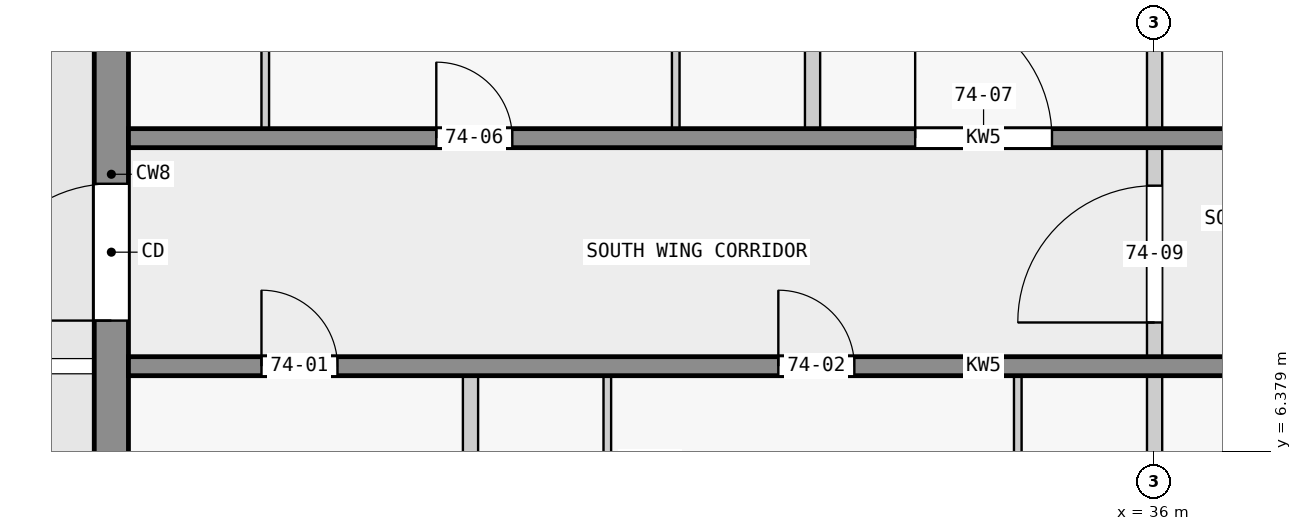
"""IFC4 building model, lengths in metres.
Left out: names, types, materials, properties, quantities, classifications, styles, units other than length and angle.
Written with IfcOpenShell. Run it as: python <this file> out.ifc"""

import sys

from ifc_helpers import new_model, si_unit, direction, frame, frame_2d, origin, place, context, subcontext, project, spatial, rectangle, extrude, element, fill, save


model = new_model("IFC4")
c1 = context("Model", 3, precision=1e-05, world=origin(), true_north=direction((0.0, 1.0)))
c2 = subcontext(c1, "Body", "Model", "MODEL_VIEW")
j1 = project(units=[si_unit("LENGTHUNIT", "METRE"), si_unit("PLANEANGLEUNIT", "RADIAN")], contexts=[c1])
p1 = place(None, origin())
s1 = spatial("IfcSite", under=j1, at=p1, CompositionType="ELEMENT")
p2 = place(p1, origin())
s2 = spatial("IfcBuilding", under=s1, at=p2, CompositionType="ELEMENT")
p3 = place(p2, frame((0.0, 0.0, 280.9)))
s3 = spatial("IfcBuildingStorey", under=s2, at=p3, CompositionType="ELEMENT", Elevation=280.9)
p4 = place(p3, frame((22.275, 2.5, 0.0), z_axis=(0.0, 0.0, 1.0), x_axis=(0.0, 1.0, 0.0)))
e1 = element("IfcWall", 1, at=p4, inside=s3, PredefinedType="SHEAR", context=c2, shape_type="SweptSolid", body=[
    extrude(rectangle(XDim=15.05, YDim=0.45, at=frame_2d((7.525, 0.0))), origin(), (0.0, 0.0, 1.0), 3.25),
])
p5 = place(p4, frame((5.6, 0.0, 0.0)))
e2 = element("IfcOpeningElement", 2, at=p5, cuts=e1, PredefinedType="OPENING", context=c2, shape_type="SweptSolid", body=[
    extrude(rectangle(XDim=1.8, YDim=2.1, at=frame_2d((0.9, 1.05))), frame((0.0, 0.235, 0.0), z_axis=(0.0, -1.0, 0.0), x_axis=(1.0, 0.0, 0.0)), (0.0, 0.0, 1.0), 0.47),
])
p6 = place(p3, frame((22.5, 7.5, 0.0), z_axis=(0.0, 0.0, 1.0), x_axis=(1.0, 0.0, 0.0)))
e3 = element("IfcWall", 3, at=p6, inside=s3, PredefinedType="SHEAR", context=c2, shape_type="SweptSolid", body=[
    extrude(rectangle(XDim=22.5, YDim=0.25, at=frame_2d((11.25, 0.0))), origin(), (0.0, 0.0, 1.0), 3.25),
])
p7 = place(p6, frame((1.75, 0.0, 0.0)))
e4 = element("IfcOpeningElement", 4, at=p7, cuts=e3, PredefinedType="OPENING", context=c2, shape_type="SweptSolid", body=[
    extrude(rectangle(XDim=1.0, YDim=2.1, at=frame_2d((0.5, 1.05))), frame((0.0, 0.135, 0.0), z_axis=(0.0, -1.0, 0.0), x_axis=(1.0, 0.0, 0.0)), (0.0, 0.0, 1.0), 0.27),
])
p8 = place(p6, frame((8.55, 0.0, 0.0)))
e5 = element("IfcOpeningElement", 5, at=p8, cuts=e3, PredefinedType="OPENING", context=c2, shape_type="SweptSolid", body=[
    extrude(rectangle(XDim=1.0, YDim=2.1, at=frame_2d((0.5, 1.05))), frame((0.0, 0.135, 0.0), z_axis=(0.0, -1.0, 0.0), x_axis=(1.0, 0.0, 0.0)), (0.0, 0.0, 1.0), 0.27),
])
p9 = place(p6, frame((15.25, 0.0, 0.0)))
e6 = element("IfcOpeningElement", 6, at=p9, cuts=e3, PredefinedType="OPENING", context=c2, shape_type="SweptSolid", body=[
    extrude(rectangle(XDim=1.0, YDim=2.1, at=frame_2d((0.5, 1.05))), frame((0.0, 0.135, 0.0), z_axis=(0.0, -1.0, 0.0), x_axis=(1.0, 0.0, 0.0)), (0.0, 0.0, 1.0), 0.27),
])
p10 = place(p6, frame((18.75, 0.0, 0.0)))
e7 = element("IfcOpeningElement", 7, at=p10, cuts=e3, PredefinedType="OPENING", context=c2, shape_type="SweptSolid", body=[
    extrude(rectangle(XDim=0.9, YDim=2.1, at=frame_2d((0.45, 1.05))), frame((0.0, 0.135, 0.0), z_axis=(0.0, -1.0, 0.0), x_axis=(1.0, 0.0, 0.0)), (0.0, 0.0, 1.0), 0.27),
])
p11 = place(p6, frame((20.95, 0.0, 0.0)))
e8 = element("IfcOpeningElement", 8, at=p11, cuts=e3, PredefinedType="OPENING", context=c2, shape_type="SweptSolid", body=[
    extrude(rectangle(XDim=1.0, YDim=2.1, at=frame_2d((0.5, 1.05))), frame((0.0, 0.135, 0.0), z_axis=(0.0, -1.0, 0.0), x_axis=(1.0, 0.0, 0.0)), (0.0, 0.0, 1.0), 0.27),
])
p12 = place(p3, frame((22.5, 10.5, 0.0), z_axis=(0.0, 0.0, 1.0), x_axis=(1.0, 0.0, 0.0)))
e9 = element("IfcWall", 9, at=p12, inside=s3, PredefinedType="SHEAR", context=c2, shape_type="SweptSolid", body=[
    extrude(rectangle(XDim=22.5, YDim=0.25, at=frame_2d((11.25, 0.0))), origin(), (0.0, 0.0, 1.0), 3.25),
])
p13 = place(p12, frame((4.05, 0.0, 0.0)))
e10 = element("IfcOpeningElement", 10, at=p13, cuts=e9, PredefinedType="OPENING", context=c2, shape_type="SweptSolid", body=[
    extrude(rectangle(XDim=1.0, YDim=2.1, at=frame_2d((0.5, 1.05))), frame((0.0, 0.135, 0.0), z_axis=(0.0, -1.0, 0.0), x_axis=(1.0, 0.0, 0.0)), (0.0, 0.0, 1.0), 0.27),
])
p14 = place(p12, frame((10.35, 0.0, 0.0)))
e11 = element("IfcOpeningElement", 11, at=p14, cuts=e9, PredefinedType="OPENING", context=c2, shape_type="SweptSolid", body=[
    extrude(rectangle(XDim=1.8, YDim=2.1, at=frame_2d((0.9, 1.05))), frame((0.0, 0.135, 0.0), z_axis=(0.0, -1.0, 0.0), x_axis=(1.0, 0.0, 0.0)), (0.0, 0.0, 1.0), 0.27),
])
p15 = place(p12, frame((16.85, 0.0, 0.0)))
e12 = element("IfcOpeningElement", 12, at=p15, cuts=e9, PredefinedType="OPENING", context=c2, shape_type="SweptSolid", body=[
    extrude(rectangle(XDim=1.0, YDim=2.1, at=frame_2d((0.5, 1.05))), frame((0.0, 0.135, 0.0), z_axis=(0.0, -1.0, 0.0), x_axis=(1.0, 0.0, 0.0)), (0.0, 0.0, 1.0), 0.27),
])
p16 = place(p3, frame((24.3, 10.625, 0.0), z_axis=(0.0, 0.0, 1.0), x_axis=(0.0, 1.0, 0.0)))
e13 = element("IfcWall", 13, at=p16, inside=s3, PredefinedType="PARTITIONING", context=c2, shape_type="SweptSolid", body=[
    extrude(rectangle(XDim=3.4, YDim=0.1, at=frame_2d((1.7, 0.0))), origin(), (0.0, 0.0, 1.0), 3.25),
])
p17 = place(p16, frame((1.25, 0.0, 0.0)))
e14 = element("IfcOpeningElement", 14, at=p17, cuts=e13, PredefinedType="OPENING", context=c2, shape_type="SweptSolid", body=[
    extrude(rectangle(XDim=0.9, YDim=2.1, at=frame_2d((0.45, 1.05))), frame((0.0, 0.06, 0.0), z_axis=(0.0, -1.0, 0.0), x_axis=(1.0, 0.0, 0.0)), (0.0, 0.0, 1.0), 0.12),
])
p18 = place(p3, frame((27.0, 1.527, 0.0), z_axis=(0.0, 0.0, 1.0), x_axis=(0.0, 1.0, 0.0)))
e15 = element("IfcWall", 15, at=p18, inside=s3, PredefinedType="PARTITIONING", context=c2, shape_type="SweptSolid", body=[
    extrude(rectangle(XDim=5.848, YDim=0.2, at=frame_2d((2.924, 0.0))), origin(), (0.0, 0.0, 1.0), 3.25),
])
p19 = place(p3, frame((28.8, 3.975, 0.0), z_axis=(0.0, 0.0, 1.0), x_axis=(0.0, 1.0, 0.0)))
e16 = element("IfcWall", 16, at=p19, inside=s3, PredefinedType="PARTITIONING", context=c2, shape_type="SweptSolid", body=[
    extrude(rectangle(XDim=3.4, YDim=0.1, at=frame_2d((1.7, 0.0))), origin(), (0.0, 0.0, 1.0), 3.25),
])
p20 = place(p19, frame((1.25, 0.0, 0.0)))
e17 = element("IfcOpeningElement", 17, at=p20, cuts=e16, PredefinedType="OPENING", context=c2, shape_type="SweptSolid", body=[
    extrude(rectangle(XDim=0.9, YDim=2.1, at=frame_2d((0.45, 1.05))), frame((0.0, 0.06, 0.0), z_axis=(0.0, -1.0, 0.0), x_axis=(1.0, 0.0, 0.0)), (0.0, 0.0, 1.0), 0.12),
])
p21 = place(p3, frame((29.7, 14.025, 0.0), z_axis=(0.0, 0.0, 1.0), x_axis=(0.0, -1.0, 0.0)))
e18 = element("IfcWall", 18, at=p21, inside=s3, PredefinedType="PARTITIONING", context=c2, shape_type="SweptSolid", body=[
    extrude(rectangle(XDim=3.4, YDim=0.1, at=frame_2d((1.7, 0.0))), origin(), (0.0, 0.0, 1.0), 3.25),
])
p22 = place(p21, frame((1.25, 0.0, 0.0)))
e19 = element("IfcOpeningElement", 19, at=p22, cuts=e18, PredefinedType="OPENING", context=c2, shape_type="SweptSolid", body=[
    extrude(rectangle(XDim=0.9, YDim=2.1, at=frame_2d((0.45, 1.05))), frame((0.0, 0.06, 0.0), z_axis=(0.0, -1.0, 0.0), x_axis=(1.0, 0.0, 0.0)), (0.0, 0.0, 1.0), 0.12),
])
p23 = place(p3, frame((31.5, 10.625, 0.0), z_axis=(0.0, 0.0, 1.0), x_axis=(0.0, 1.0, 0.0)))
e20 = element("IfcWall", 20, at=p23, inside=s3, PredefinedType="PARTITIONING", context=c2, shape_type="SweptSolid", body=[
    extrude(rectangle(XDim=3.4, YDim=0.2, at=frame_2d((1.7, 0.0))), origin(), (0.0, 0.0, 1.0), 3.25),
])
p24 = place(p3, frame((34.2, 7.375, 0.0), z_axis=(0.0, 0.0, 1.0), x_axis=(0.0, -1.0, 0.0)))
e21 = element("IfcWall", 21, at=p24, inside=s3, PredefinedType="PARTITIONING", context=c2, shape_type="SweptSolid", body=[
    extrude(rectangle(XDim=3.4, YDim=0.1, at=frame_2d((1.7, 0.0))), origin(), (0.0, 0.0, 1.0), 3.25),
])
p25 = place(p24, frame((1.25, 0.0, 0.0)))
e22 = element("IfcOpeningElement", 22, at=p25, cuts=e21, PredefinedType="OPENING", context=c2, shape_type="SweptSolid", body=[
    extrude(rectangle(XDim=0.9, YDim=2.1, at=frame_2d((0.45, 1.05))), frame((0.0, 0.06, 0.0), z_axis=(0.0, -1.0, 0.0), x_axis=(1.0, 0.0, 0.0)), (0.0, 0.0, 1.0), 0.12),
])
p26 = place(p3, frame((36.0, 3.975, 0.0), z_axis=(0.0, 0.0, 1.0), x_axis=(0.0, 1.0, 0.0)))
e23 = element("IfcWall", 23, at=p26, inside=s3, PredefinedType="PARTITIONING", context=c2, shape_type="SweptSolid", body=[
    extrude(rectangle(XDim=3.4, YDim=0.2, at=frame_2d((1.7, 0.0))), origin(), (0.0, 0.0, 1.0), 3.25),
])
p27 = place(p3, frame((36.0, 10.625, 0.0), z_axis=(0.0, 0.0, 1.0), x_axis=(0.0, 1.0, 0.0)))
e24 = element("IfcWall", 24, at=p27, inside=s3, PredefinedType="PARTITIONING", context=c2, shape_type="SweptSolid", body=[
    extrude(rectangle(XDim=5.975, YDim=0.2, at=frame_2d((2.988, 0.0))), origin(), (0.0, 0.0, 1.0), 3.25),
])
p28 = place(p3, frame((36.0, 7.475, 0.0), z_axis=(0.0, 0.0, 1.0), x_axis=(0.0, 1.0, 0.0)))
e25 = element("IfcWall", 25, at=p28, inside=s3, PredefinedType="PARTITIONING", context=c2, shape_type="SweptSolid", body=[
    extrude(rectangle(XDim=3.05, YDim=0.2, at=frame_2d((1.525, 0.0))), origin(), (0.0, 0.0, 1.0), 3.25),
])
p29 = place(p28, frame((0.6, 0.0, 0.0)))
e26 = element("IfcOpeningElement", 26, at=p29, cuts=e25, PredefinedType="OPENING", context=c2, shape_type="SweptSolid", body=[
    extrude(rectangle(XDim=1.8, YDim=2.1, at=frame_2d((0.9, 1.05))), frame((0.0, 0.11, 0.0), z_axis=(0.0, -1.0, 0.0), x_axis=(1.0, 0.0, 0.0)), (0.0, 0.0, 1.0), 0.22),
])
p30 = place(p5, origin())
e27 = element("IfcDoor", 27, at=p30, inside=s3, OperationType="DOUBLE_DOOR_SINGLE_SWING", PredefinedType="DOOR", context=c2, shape_type="SweptSolid", body=[
    extrude(rectangle(XDim=1.8, YDim=2.1, at=frame_2d((0.9, 1.05))), frame((0.0, 0.025, 0.0), z_axis=(0.0, -1.0, 0.0), x_axis=(1.0, 0.0, 0.0)), (0.0, 0.0, 1.0), 0.05),
])
fill(e2, e27)
p31 = place(p7, origin())
e28 = element("IfcDoor", 28, at=p31, inside=s3, OperationType="SINGLE_SWING_LEFT", PredefinedType="DOOR", context=c2, shape_type="SweptSolid", body=[
    extrude(rectangle(XDim=1.0, YDim=2.1, at=frame_2d((0.5, 1.05))), frame((0.0, 0.025, 0.0), z_axis=(0.0, -1.0, 0.0), x_axis=(1.0, 0.0, 0.0)), (0.0, 0.0, 1.0), 0.05),
])
fill(e4, e28)
p32 = place(p8, origin())
e29 = element("IfcDoor", 29, at=p32, inside=s3, OperationType="SINGLE_SWING_LEFT", PredefinedType="DOOR", context=c2, shape_type="SweptSolid", body=[
    extrude(rectangle(XDim=1.0, YDim=2.1, at=frame_2d((0.5, 1.05))), frame((0.0, 0.025, 0.0), z_axis=(0.0, -1.0, 0.0), x_axis=(1.0, 0.0, 0.0)), (0.0, 0.0, 1.0), 0.05),
])
fill(e5, e29)
p33 = place(p13, origin())
e30 = element("IfcDoor", 30, at=p33, inside=s3, OperationType="SINGLE_SWING_LEFT", PredefinedType="DOOR", context=c2, shape_type="SweptSolid", body=[
    extrude(rectangle(XDim=1.0, YDim=2.1, at=frame_2d((0.5, 1.05))), frame((0.0, 0.025, 0.0), z_axis=(0.0, -1.0, 0.0), x_axis=(1.0, 0.0, 0.0)), (0.0, 0.0, 1.0), 0.05),
])
fill(e10, e30)
p34 = place(p14, origin())
e31 = element("IfcDoor", 31, at=p34, inside=s3, OperationType="SINGLE_SWING_LEFT", PredefinedType="DOOR", context=c2, shape_type="SweptSolid", body=[
    extrude(rectangle(XDim=1.8, YDim=2.1, at=frame_2d((0.9, 1.05))), frame((0.0, 0.025, 0.0), z_axis=(0.0, -1.0, 0.0), x_axis=(1.0, 0.0, 0.0)), (0.0, 0.0, 1.0), 0.05),
])
fill(e11, e31)
p35 = place(p29, origin())
e32 = element("IfcDoor", 32, at=p35, inside=s3, OperationType="SINGLE_SWING_LEFT", PredefinedType="DOOR", context=c2, shape_type="SweptSolid", body=[
    extrude(rectangle(XDim=1.8, YDim=2.1, at=frame_2d((0.9, 1.05))), frame((0.0, 0.025, 0.0), z_axis=(0.0, -1.0, 0.0), x_axis=(1.0, 0.0, 0.0)), (0.0, 0.0, 1.0), 0.05),
])
fill(e26, e32)
save(model, sys.argv[1])
